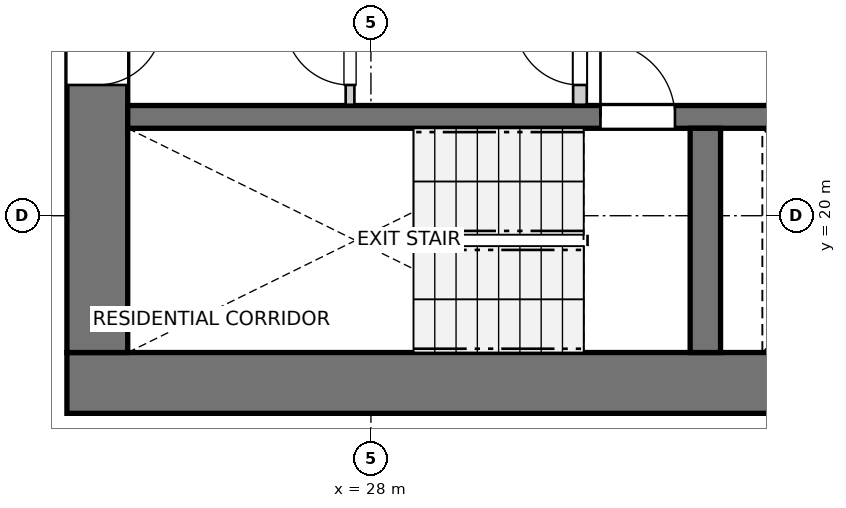
"""IFC4 building model, lengths in metres.
Left out: names, types, materials, properties, quantities, classifications, styles, units other than length and angle.
Written with IfcOpenShell. Run it as: python <this file> out.ifc"""

import sys

from ifc_helpers import new_model, si_unit, direction, frame, frame_2d, origin, place, context, subcontext, project, spatial, rectangle, extrude, source, transform, mapped, element, fill, save


model = new_model("IFC4")
c1 = context("Model", 3, precision=1e-05, world=origin(), true_north=direction((0.0, 1.0)))
c2 = subcontext(c1, "Body", "Model", "MODEL_VIEW")
j1 = project(units=[si_unit("LENGTHUNIT", "METRE"), si_unit("PLANEANGLEUNIT", "RADIAN")], contexts=[c1])
p1 = place(None, origin())
s1 = spatial("IfcSite", under=j1, at=p1, CompositionType="ELEMENT")
p2 = place(p1, origin())
s2 = spatial("IfcBuilding", under=s1, at=p2, CompositionType="ELEMENT")
p3 = place(p2, frame((0.0, 0.0, 23.8)))
s3 = spatial("IfcBuildingStorey", under=s2, at=p3, CompositionType="ELEMENT", Elevation=23.8)
p4 = place(p3, frame((24.0, 17.8, 0.0), z_axis=(0.0, 0.0, 1.0), x_axis=(1.0, 0.0, 0.0)))
e1 = element("IfcWall", 1, at=p4, inside=s3, PredefinedType="SHEAR", context=c2, shape_type="SweptSolid", body=[
    extrude(rectangle(XDim=12.7, YDim=0.8, at=frame_2d((6.35, 0.0))), origin(), (0.0, 0.0, 1.0), 2.935),
])
p5 = place(p3, frame((24.4, 33.8, 0.0), z_axis=(0.0, 0.0, 1.0), x_axis=(0.0, -1.0, 0.0)))
e2 = element("IfcWall", 2, at=p5, inside=s3, PredefinedType="SHEAR", context=c2, shape_type="SweptSolid", body=[
    extrude(rectangle(XDim=15.6, YDim=0.8, at=frame_2d((7.8, 0.0))), origin(), (0.0, 0.0, 1.0), 2.935),
])
p6 = place(p5, frame((7.05, 0.0, 0.0)))
e3 = element("IfcOpeningElement", 3, at=p6, cuts=e2, PredefinedType="OPENING", context=c2, shape_type="SweptSolid", body=[
    extrude(rectangle(XDim=1.5, YDim=2.15, at=frame_2d((0.75, 1.075))), frame((0.0, 0.41, 0.0), z_axis=(0.0, -1.0, 0.0), x_axis=(1.0, 0.0, 0.0)), (0.0, 0.0, 1.0), 0.82),
])
p7 = place(p5, frame((3.52, 0.0, 0.0)))
e4 = element("IfcOpeningElement", 4, at=p7, cuts=e2, PredefinedType="OPENING", context=c2, shape_type="SweptSolid", body=[
    extrude(rectangle(XDim=0.86, YDim=2.05, at=frame_2d((0.43, 1.025))), frame((0.0, 0.41, 0.0), z_axis=(0.0, -1.0, 0.0), x_axis=(1.0, 0.0, 0.0)), (0.0, 0.0, 1.0), 0.82),
])
p8 = place(p5, frame((11.22, 0.0, 0.0)))
e5 = element("IfcOpeningElement", 5, at=p8, cuts=e2, PredefinedType="OPENING", context=c2, shape_type="SweptSolid", body=[
    extrude(rectangle(XDim=0.86, YDim=2.05, at=frame_2d((0.43, 1.025))), frame((0.0, 0.41, 0.0), z_axis=(0.0, -1.0, 0.0), x_axis=(1.0, 0.0, 0.0)), (0.0, 0.0, 1.0), 0.82),
])
p9 = place(p3, frame((24.8, 21.3, 0.0), z_axis=(0.0, 0.0, 1.0), x_axis=(1.0, 0.0, 0.0)))
e6 = element("IfcWall", 6, at=p9, inside=s3, PredefinedType="SHEAR", context=c2, shape_type="SweptSolid", body=[
    extrude(rectangle(XDim=11.1, YDim=0.3, at=frame_2d((5.55, 0.0))), origin(), (0.0, 0.0, 1.0), 2.935),
])
p10 = place(p9, frame((6.22, 0.0, 0.0)))
e7 = element("IfcOpeningElement", 7, at=p10, cuts=e6, PredefinedType="OPENING", context=c2, shape_type="SweptSolid", body=[
    extrude(rectangle(XDim=0.98, YDim=2.15, at=frame_2d((0.49, 1.075))), frame((0.0, 0.16, 0.0), z_axis=(0.0, -1.0, 0.0), x_axis=(1.0, 0.0, 0.0)), (0.0, 0.0, 1.0), 0.32),
])
p11 = place(p9, frame((9.15, 0.0, 0.0)))
e8 = element("IfcOpeningElement", 8, at=p11, cuts=e6, PredefinedType="OPENING", context=c2, shape_type="SweptSolid", body=[
    extrude(rectangle(XDim=1.15, YDim=2.15, at=frame_2d((0.575, 1.075))), frame((0.0, 0.16, 0.0), z_axis=(0.0, -1.0, 0.0), x_axis=(1.0, 0.0, 0.0)), (0.0, 0.0, 1.0), 0.32),
])
p12 = place(p3, frame((32.4, 18.2, 0.0), z_axis=(0.0, 0.0, 1.0), x_axis=(0.0, 1.0, 0.0)))
e9 = element("IfcWall", 9, at=p12, inside=s3, PredefinedType="SHEAR", context=c2, shape_type="SweptSolid", body=[
    extrude(rectangle(XDim=2.95, YDim=0.4, at=frame_2d((1.475, 0.0))), origin(), (0.0, 0.0, 1.0), 2.935),
])
p13 = place(p3, frame((30.75, 21.46, 0.0), z_axis=(0.0, 0.0, 1.0), x_axis=(0.0, 1.0, 0.0)))
e10 = element("IfcWall", 10, at=p13, inside=s3, PredefinedType="PARTITIONING", context=c2, shape_type="SweptSolid", body=[
    extrude(rectangle(XDim=3.11, YDim=0.18, at=frame_2d((1.555, 0.0))), origin(), (0.0, 0.0, 1.0), 2.935),
])
p14 = place(p13, frame((0.26, 0.0, 0.0)))
e11 = element("IfcOpeningElement", 11, at=p14, cuts=e10, PredefinedType="OPENING", context=c2, shape_type="SweptSolid", body=[
    extrude(rectangle(XDim=0.86, YDim=2.05, at=frame_2d((0.43, 1.025))), frame((0.0, 0.1, 0.0), z_axis=(0.0, -1.0, 0.0), x_axis=(1.0, 0.0, 0.0)), (0.0, 0.0, 1.0), 0.2),
])
p15 = place(p3, frame((27.725, 21.46, 0.0), z_axis=(0.0, 0.0, 1.0), x_axis=(0.0, 1.0, 0.0)))
e12 = element("IfcWall", 12, at=p15, inside=s3, PredefinedType="PARTITIONING", context=c2, shape_type="SweptSolid", body=[
    extrude(rectangle(XDim=1.38, YDim=0.115, at=frame_2d((0.69, 0.0))), origin(), (0.0, 0.0, 1.0), 2.935),
])
p16 = place(p15, frame((0.26, 0.0, 0.0)))
e13 = element("IfcOpeningElement", 13, at=p16, cuts=e12, PredefinedType="OPENING", context=c2, shape_type="SweptSolid", body=[
    extrude(rectangle(XDim=0.86, YDim=2.05, at=frame_2d((0.43, 1.025))), frame((0.0, 0.067, 0.0), z_axis=(0.0, -1.0, 0.0), x_axis=(1.0, 0.0, 0.0)), (0.0, 0.0, 1.0), 0.135),
])
m1 = source(origin(), c2, "Body", "SweptSolid", [
    extrude(rectangle(XDim=0.98, YDim=2.15, at=frame_2d((0.49, 1.075))), frame((0.0, 0.025, 0.0), z_axis=(0.0, -1.0, 0.0), x_axis=(1.0, 0.0, 0.0)), (0.0, 0.0, 1.0), 0.05),
])
p17 = place(p10, origin())
e14 = element("IfcDoor", 14, at=p17, inside=s3, OperationType="SINGLE_SWING_LEFT", PredefinedType="DOOR", context=c2, shape_type="MappedRepresentation", body=[
    mapped(m1, transform((0.0, 0.0, 0.0), x_axis=(1.0, 0.0, 0.0), y_axis=(0.0, 1.0, 0.0), z_axis=(0.0, 0.0, 1.0), scale=1.0)),
])
fill(e7, e14)
m2 = source(origin(), c2, "Body", "SweptSolid", [
    extrude(rectangle(XDim=0.86, YDim=2.05, at=frame_2d((0.43, 1.025))), frame((0.0, 0.025, 0.0), z_axis=(0.0, -1.0, 0.0), x_axis=(1.0, 0.0, 0.0)), (0.0, 0.0, 1.0), 0.05),
])
p18 = place(p8, origin())
e15 = element("IfcDoor", 15, at=p18, inside=s3, OperationType="SINGLE_SWING_LEFT", PredefinedType="DOOR", context=c2, shape_type="MappedRepresentation", body=[
    mapped(m2, transform((0.0, 0.0, 0.0), x_axis=(1.0, 0.0, 0.0), y_axis=(0.0, 1.0, 0.0), z_axis=(0.0, 0.0, 1.0), scale=1.0)),
])
fill(e5, e15)
p19 = place(p14, origin())
e16 = element("IfcDoor", 16, at=p19, inside=s3, OperationType="SINGLE_SWING_RIGHT", PredefinedType="DOOR", context=c2, shape_type="MappedRepresentation", body=[
    mapped(m2, transform((0.0, 0.0, 0.0), x_axis=(1.0, 0.0, 0.0), y_axis=(0.0, 1.0, 0.0), z_axis=(0.0, 0.0, 1.0), scale=1.0)),
])
fill(e11, e16)
p20 = place(p16, origin())
e17 = element("IfcDoor", 17, at=p20, inside=s3, OperationType="SINGLE_SWING_RIGHT", PredefinedType="DOOR", context=c2, shape_type="MappedRepresentation", body=[
    mapped(m2, transform((0.0, 0.0, 0.0), x_axis=(1.0, 0.0, 0.0), y_axis=(0.0, 1.0, 0.0), z_axis=(0.0, 0.0, 1.0), scale=1.0)),
])
fill(e13, e17)
save(model, sys.argv[1])
